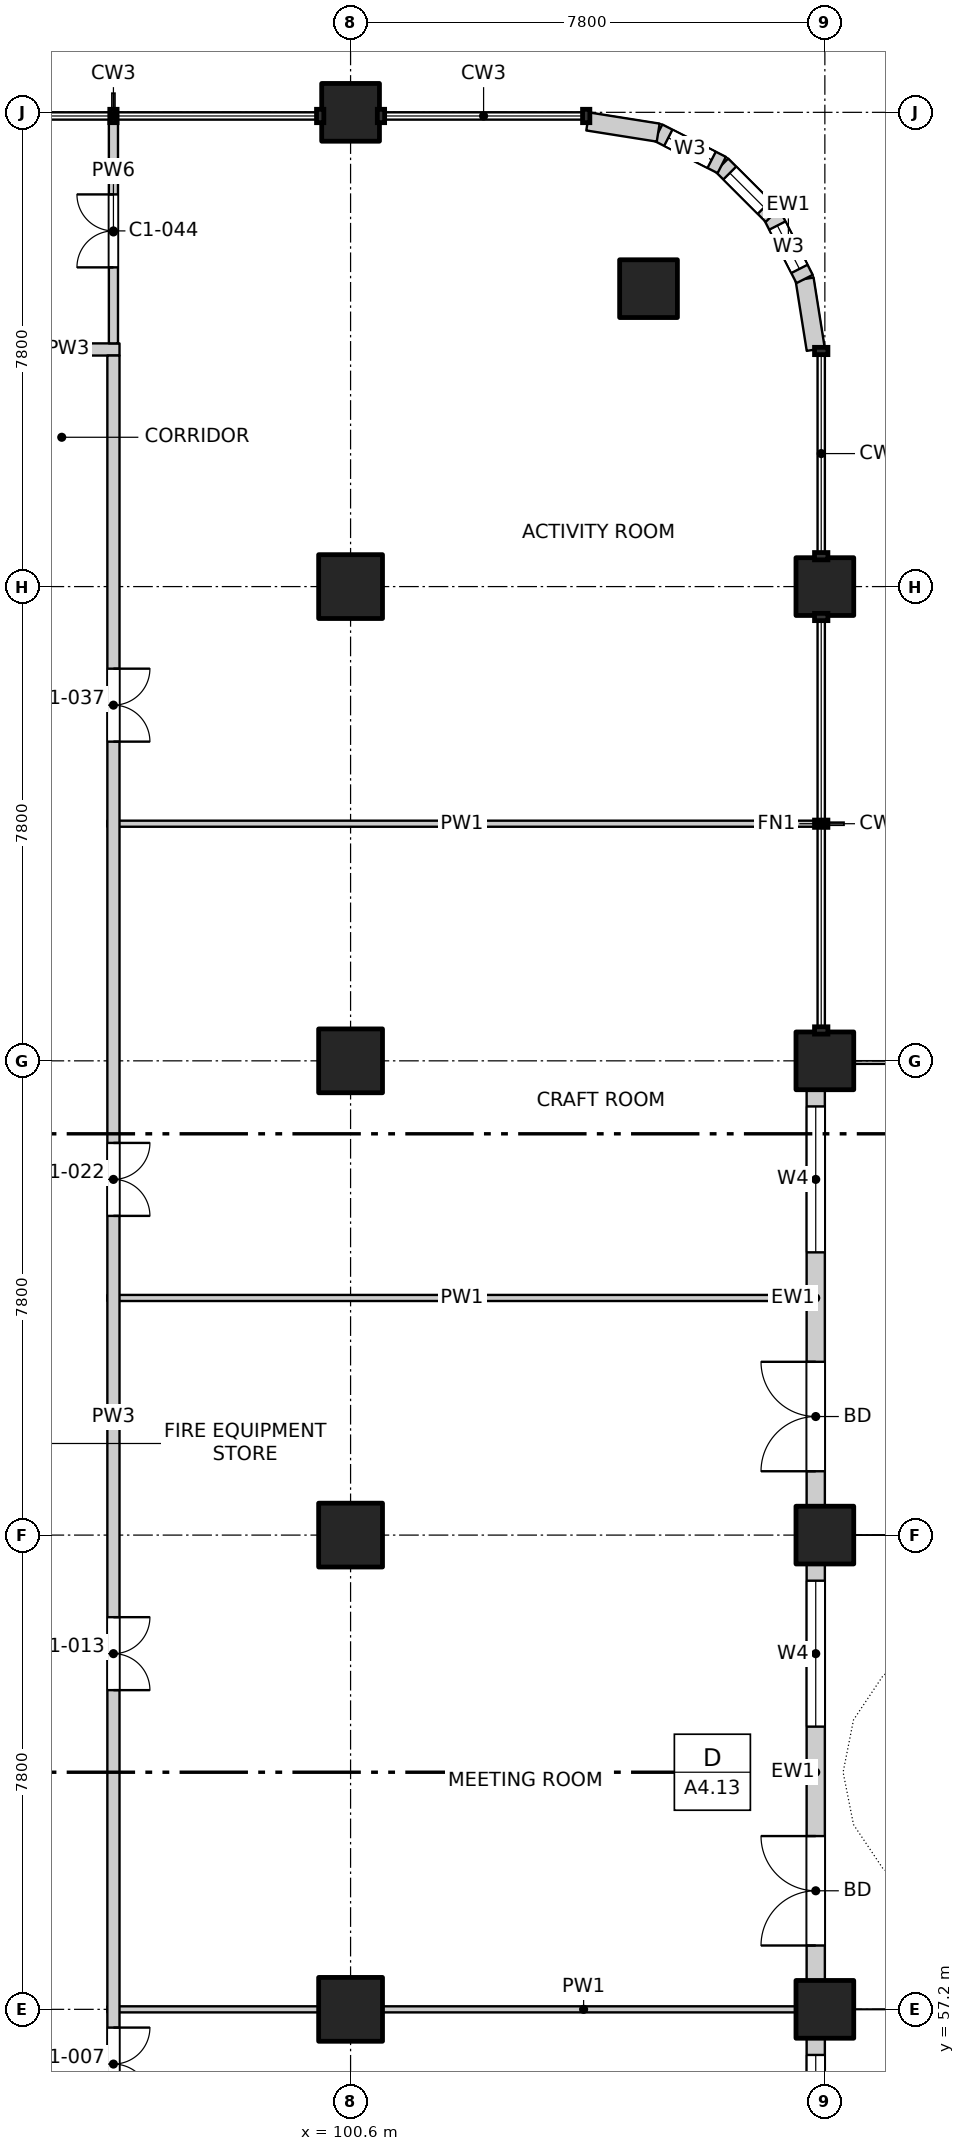
"""IFC4 building model, lengths in metres.
Left out: names, types, materials, properties, quantities, classifications, styles, units other than length and angle.
Written with IfcOpenShell. Run it as: python <this file> out.ifc"""

import sys

from ifc_helpers import new_model, si_unit, direction, frame, frame_2d, origin, origin_2d, place, context, subcontext, project, spatial, rectangle, extrude, element, fill, save


model = new_model("IFC4")
c1 = context("Model", 3, precision=1e-05, world=origin(), true_north=direction((0.0, 1.0)))
c2 = subcontext(c1, "Body", "Model", "MODEL_VIEW")
j1 = project(units=[si_unit("LENGTHUNIT", "METRE"), si_unit("PLANEANGLEUNIT", "RADIAN")], contexts=[c1])
p1 = place(None, origin())
s1 = spatial("IfcSite", under=j1, at=p1, CompositionType="ELEMENT")
p2 = place(p1, origin())
s2 = spatial("IfcBuilding", under=s1, at=p2, CompositionType="ELEMENT")
p3 = place(p2, frame((0.0, 0.0, 71.6)))
s3 = spatial("IfcBuildingStorey", under=s2, at=p3, CompositionType="ELEMENT", Elevation=71.6)
for number, where, z_axis, x_axis in (
    (1, (105.5, 85.5, -0.25), (0.0, 0.0, 1.0), (1.0, 0.0, 0.0)),
    (2, (108.4, 57.2, -0.25), (0.0, 0.0, 1.0), (1.0, 0.0, 0.0)),
    (3, (108.4, 65.0, -0.25), (0.0, 0.0, 1.0), (1.0, 0.0, 0.0)),
    (4, (108.4, 72.8, -0.25), (0.0, 0.0, 1.0), (1.0, 0.0, 0.0)),
    (5, (108.4, 80.6, -0.25), (0.0, 0.0, 1.0), (1.0, 0.0, 0.0)),
    (6, (100.6, 88.4, -0.25), (0.0, 0.0, 1.0), (1.0, 0.0, 0.0)),
):
    element("IfcColumn", number, at=place(p3, frame(where, z_axis=z_axis, x_axis=x_axis)), inside=s3, PredefinedType="COLUMN", context=c2, shape_type="SweptSolid", body=[
        extrude(rectangle(XDim=0.95, YDim=0.95, at=origin_2d()), origin(), (0.0, 0.0, 1.0), 3.4),
    ])
for number, where, z_axis, x_axis in (
    (7, (100.6, 57.2, -0.25), (0.0, 0.0, 1.0), (1.0, 0.0, 0.0)),
    (8, (100.6, 65.0, -0.25), (0.0, 0.0, 1.0), (1.0, 0.0, 0.0)),
    (9, (100.6, 72.8, -0.25), (0.0, 0.0, 1.0), (1.0, 0.0, 0.0)),
    (10, (100.6, 80.6, -0.25), (0.0, 0.0, 1.0), (1.0, 0.0, 0.0)),
):
    element("IfcColumn", number, at=place(p3, frame(where, z_axis=z_axis, x_axis=x_axis)), inside=s3, PredefinedType="COLUMN", context=c2, shape_type="SweptSolid", body=[
        extrude(rectangle(XDim=1.05, YDim=1.05, at=origin_2d()), origin(), (0.0, 0.0, 1.0), 3.4),
    ])
p4 = place(p3, frame((108.25, 49.875, 0.0), z_axis=(0.0, 0.0, 1.0), x_axis=(0.0, 1.0, 0.0)))
e11 = element("IfcWall", 11, at=p4, inside=s3, PredefinedType="SOLIDWALL", context=c2, shape_type="SweptSolid", body=[
    extrude(rectangle(XDim=6.85, YDim=0.3, at=frame_2d((3.425, 0.0))), origin(), (0.0, 0.0, 1.0), 2.7),
])
p5 = place(p4, frame((0.575, 0.0, 0.0)))
e12 = element("IfcOpeningElement", 12, at=p5, cuts=e11, PredefinedType="OPENING", context=c2, shape_type="SweptSolid", body=[
    extrude(rectangle(XDim=1.8, YDim=2.4, at=frame_2d((0.9, 1.2))), frame((0.0, 0.16, 0.0), z_axis=(0.0, -1.0, 0.0), x_axis=(1.0, 0.0, 0.0)), (0.0, 0.0, 1.0), 0.32),
])
p6 = place(p4, frame((4.175, 0.0, 0.6)))
e13 = element("IfcOpeningElement", 13, at=p6, cuts=e11, PredefinedType="OPENING", context=c2, shape_type="SweptSolid", body=[
    extrude(rectangle(XDim=2.4, YDim=2.1, at=frame_2d((1.2, 1.05))), frame((0.0, 0.16, 0.0), z_axis=(0.0, -1.0, 0.0), x_axis=(1.0, 0.0, 0.0)), (0.0, 0.0, 1.0), 0.32),
])
p7 = place(p3, frame((108.25, 57.675, 0.0), z_axis=(0.0, 0.0, 1.0), x_axis=(0.0, 1.0, 0.0)))
e14 = element("IfcWall", 14, at=p7, inside=s3, PredefinedType="SOLIDWALL", context=c2, shape_type="SweptSolid", body=[
    extrude(rectangle(XDim=6.85, YDim=0.3, at=frame_2d((3.425, 0.0))), origin(), (0.0, 0.0, 1.0), 2.7),
])
p8 = place(p7, frame((0.575, 0.0, 0.0)))
e15 = element("IfcOpeningElement", 15, at=p8, cuts=e14, PredefinedType="OPENING", context=c2, shape_type="SweptSolid", body=[
    extrude(rectangle(XDim=1.8, YDim=2.4, at=frame_2d((0.9, 1.2))), frame((0.0, 0.16, 0.0), z_axis=(0.0, -1.0, 0.0), x_axis=(1.0, 0.0, 0.0)), (0.0, 0.0, 1.0), 0.32),
])
p9 = place(p7, frame((4.175, 0.0, 0.6)))
e16 = element("IfcOpeningElement", 16, at=p9, cuts=e14, PredefinedType="OPENING", context=c2, shape_type="SweptSolid", body=[
    extrude(rectangle(XDim=2.4, YDim=2.1, at=frame_2d((1.2, 1.05))), frame((0.0, 0.16, 0.0), z_axis=(0.0, -1.0, 0.0), x_axis=(1.0, 0.0, 0.0)), (0.0, 0.0, 1.0), 0.32),
])
p10 = place(p3, frame((108.25, 65.475, 0.0), z_axis=(0.0, 0.0, 1.0), x_axis=(0.0, 1.0, 0.0)))
e17 = element("IfcWall", 17, at=p10, inside=s3, PredefinedType="SOLIDWALL", context=c2, shape_type="SweptSolid", body=[
    extrude(rectangle(XDim=6.85, YDim=0.3, at=frame_2d((3.425, 0.0))), origin(), (0.0, 0.0, 1.0), 2.7),
])
p11 = place(p10, frame((0.575, 0.0, 0.0)))
e18 = element("IfcOpeningElement", 18, at=p11, cuts=e17, PredefinedType="OPENING", context=c2, shape_type="SweptSolid", body=[
    extrude(rectangle(XDim=1.8, YDim=2.4, at=frame_2d((0.9, 1.2))), frame((0.0, 0.16, 0.0), z_axis=(0.0, -1.0, 0.0), x_axis=(1.0, 0.0, 0.0)), (0.0, 0.0, 1.0), 0.32),
])
p12 = place(p10, frame((4.175, 0.0, 0.6)))
e19 = element("IfcOpeningElement", 19, at=p12, cuts=e17, PredefinedType="OPENING", context=c2, shape_type="SweptSolid", body=[
    extrude(rectangle(XDim=2.4, YDim=2.1, at=frame_2d((1.2, 1.05))), frame((0.0, 0.16, 0.0), z_axis=(0.0, -1.0, 0.0), x_axis=(1.0, 0.0, 0.0)), (0.0, 0.0, 1.0), 0.32),
])
p13 = place(p3, frame((108.25, 84.5, 0.0), z_axis=(0.0, 0.0, 1.0), x_axis=(-0.156496880861, 0.987678452879, 0.0)))
e20 = element("IfcWall", 20, at=p13, inside=s3, PredefinedType="SOLIDWALL", context=c2, shape_type="SweptSolid", body=[
    extrude(rectangle(XDim=1.173, YDim=0.3, at=frame_2d((0.586, 0.0))), origin(), (0.0, 0.0, 1.0), 2.7),
])
p14 = place(p3, frame((108.066, 85.659, 0.0), z_axis=(0.0, 0.0, 1.0), x_axis=(-0.454025524128, 0.890988677504, 0.0)))
e21 = element("IfcWall", 21, at=p14, inside=s3, PredefinedType="SOLIDWALL", context=c2, shape_type="SweptSolid", body=[
    extrude(rectangle(XDim=1.173, YDim=0.3, at=frame_2d((0.587, 0.0))), origin(), (0.0, 0.0, 1.0), 2.7),
])
p15 = place(p14, frame((0.187, 0.0, 0.9)))
e22 = element("IfcOpeningElement", 22, at=p15, cuts=e21, PredefinedType="OPENING", context=c2, shape_type="SweptSolid", body=[
    extrude(rectangle(XDim=0.8, YDim=1.2, at=frame_2d((0.4, 0.6))), frame((0.0, 0.16, 0.0), z_axis=(0.0, -1.0, 0.0), x_axis=(1.0, 0.0, 0.0)), (0.0, 0.0, 1.0), 0.32),
])
p16 = place(p3, frame((107.534, 86.704, 0.0), z_axis=(0.0, 0.0, 1.0), x_axis=(-0.707106781187, 0.707106781187, 0.0)))
e23 = element("IfcWall", 23, at=p16, inside=s3, PredefinedType="SOLIDWALL", context=c2, shape_type="SweptSolid", body=[
    extrude(rectangle(XDim=1.173, YDim=0.3, at=frame_2d((0.586, 0.0))), origin(), (0.0, 0.0, 1.0), 2.7),
])
p17 = place(p16, frame((0.187, 0.0, 0.9)))
e24 = element("IfcOpeningElement", 24, at=p17, cuts=e23, PredefinedType="OPENING", context=c2, shape_type="SweptSolid", body=[
    extrude(rectangle(XDim=0.8, YDim=1.2, at=frame_2d((0.4, 0.6))), frame((0.0, 0.16, 0.0), z_axis=(0.0, -1.0, 0.0), x_axis=(1.0, 0.0, 0.0)), (0.0, 0.0, 1.0), 0.32),
])
p18 = place(p3, frame((106.704, 87.534, 0.0), z_axis=(0.0, 0.0, 1.0), x_axis=(-0.890988677504, 0.454025524128, 0.0)))
e25 = element("IfcWall", 25, at=p18, inside=s3, PredefinedType="SOLIDWALL", context=c2, shape_type="SweptSolid", body=[
    extrude(rectangle(XDim=1.173, YDim=0.3, at=frame_2d((0.587, 0.0))), origin(), (0.0, 0.0, 1.0), 2.7),
])
p19 = place(p18, frame((0.187, 0.0, 0.9)))
e26 = element("IfcOpeningElement", 26, at=p19, cuts=e25, PredefinedType="OPENING", context=c2, shape_type="SweptSolid", body=[
    extrude(rectangle(XDim=0.8, YDim=1.2, at=frame_2d((0.4, 0.6))), frame((0.0, 0.16, 0.0), z_axis=(0.0, -1.0, 0.0), x_axis=(1.0, 0.0, 0.0)), (0.0, 0.0, 1.0), 0.32),
])
p20 = place(p3, frame((105.659, 88.066, 0.0), z_axis=(0.0, 0.0, 1.0), x_axis=(-0.987678452879, 0.156496880861, 0.0)))
e27 = element("IfcWall", 27, at=p20, inside=s3, PredefinedType="SOLIDWALL", context=c2, shape_type="SweptSolid", body=[
    extrude(rectangle(XDim=1.173, YDim=0.3, at=frame_2d((0.586, 0.0))), origin(), (0.0, 0.0, 1.0), 2.7),
])
p21 = place(p3, frame((96.6, 57.2, 0.0), z_axis=(0.0, 0.0, 1.0), x_axis=(1.0, 0.0, 0.0)))
e28 = element("IfcWall", 28, at=p21, inside=s3, PredefinedType="PARTITIONING", context=c2, shape_type="SweptSolid", body=[
    extrude(rectangle(XDim=4.0, YDim=0.1, at=frame_2d((2.0, 0.0))), origin(), (0.0, 0.0, 1.0), 3.15),
])
p22 = place(p3, frame((100.6, 57.2, 0.0), z_axis=(0.0, 0.0, 1.0), x_axis=(1.0, 0.0, 0.0)))
e29 = element("IfcWall", 29, at=p22, inside=s3, PredefinedType="PARTITIONING", context=c2, shape_type="SweptSolid", body=[
    extrude(rectangle(XDim=7.665, YDim=0.1, at=frame_2d((3.833, 0.0))), origin(), (0.0, 0.0, 1.0), 2.55),
])
for number, where, z_axis, x_axis in (
    (30, (96.6, 68.9, 0.0), (0.0, 0.0, 1.0), (1.0, 0.0, 0.0)),
    (31, (96.6, 76.7, 0.0), (0.0, 0.0, 1.0), (1.0, 0.0, 0.0)),
):
    element("IfcWall", number, at=place(p3, frame(where, z_axis=z_axis, x_axis=x_axis)), inside=s3, PredefinedType="PARTITIONING", context=c2, shape_type="SweptSolid", body=[
        extrude(rectangle(XDim=11.665, YDim=0.1, at=frame_2d((5.833, 0.0))), origin(), (0.0, 0.0, 1.0), 3.15),
    ])
p23 = place(p3, frame((95.1, 84.5, 0.0), z_axis=(0.0, 0.0, 1.0), x_axis=(1.0, 0.0, 0.0)))
e32 = element("IfcWall", 32, at=p23, inside=s3, PredefinedType="PARTITIONING", context=c2, shape_type="SweptSolid", body=[
    extrude(rectangle(XDim=1.7, YDim=0.2, at=frame_2d((0.85, 0.0))), origin(), (0.0, 0.0, 1.0), 3.15),
])
p24 = place(p3, frame((96.7, 49.5, 0.0), z_axis=(0.0, 0.0, 1.0), x_axis=(0.0, 1.0, 0.0)))
e33 = element("IfcWall", 33, at=p24, inside=s3, PredefinedType="PARTITIONING", context=c2, shape_type="SweptSolid", body=[
    extrude(rectangle(XDim=34.9, YDim=0.2, at=frame_2d((17.45, 0.0))), origin(), (0.0, 0.0, 1.0), 3.15),
])
p25 = place(p24, frame((6.2, 0.0, 0.0)))
e34 = element("IfcOpeningElement", 34, at=p25, cuts=e33, PredefinedType="OPENING", context=c2, shape_type="SweptSolid", body=[
    extrude(rectangle(XDim=1.2, YDim=2.1, at=frame_2d((0.6, 1.05))), frame((0.0, 0.11, 0.0), z_axis=(0.0, -1.0, 0.0), x_axis=(1.0, 0.0, 0.0)), (0.0, 0.0, 1.0), 0.22),
])
p26 = place(p24, frame((12.95, 0.0, 0.0)))
e35 = element("IfcOpeningElement", 35, at=p26, cuts=e33, PredefinedType="OPENING", context=c2, shape_type="SweptSolid", body=[
    extrude(rectangle(XDim=1.2, YDim=2.1, at=frame_2d((0.6, 1.05))), frame((0.0, 0.11, 0.0), z_axis=(0.0, -1.0, 0.0), x_axis=(1.0, 0.0, 0.0)), (0.0, 0.0, 1.0), 0.22),
])
p27 = place(p24, frame((20.75, 0.0, 0.0)))
e36 = element("IfcOpeningElement", 36, at=p27, cuts=e33, PredefinedType="OPENING", context=c2, shape_type="SweptSolid", body=[
    extrude(rectangle(XDim=1.2, YDim=2.1, at=frame_2d((0.6, 1.05))), frame((0.0, 0.11, 0.0), z_axis=(0.0, -1.0, 0.0), x_axis=(1.0, 0.0, 0.0)), (0.0, 0.0, 1.0), 0.22),
])
p28 = place(p24, frame((28.55, 0.0, 0.0)))
e37 = element("IfcOpeningElement", 37, at=p28, cuts=e33, PredefinedType="OPENING", context=c2, shape_type="SweptSolid", body=[
    extrude(rectangle(XDim=1.2, YDim=2.1, at=frame_2d((0.6, 1.05))), frame((0.0, 0.11, 0.0), z_axis=(0.0, -1.0, 0.0), x_axis=(1.0, 0.0, 0.0)), (0.0, 0.0, 1.0), 0.22),
])
p29 = place(p3, frame((96.7, 84.6, 0.0), z_axis=(0.0, 0.0, 1.0), x_axis=(0.0, 1.0, 0.0)))
e38 = element("IfcWall", 38, at=p29, inside=s3, PredefinedType="PARTITIONING", context=c2, shape_type="SweptSolid", body=[
    extrude(rectangle(XDim=3.665, YDim=0.15, at=frame_2d((1.833, 0.0))), origin(), (0.0, 0.0, 1.0), 3.15),
])
p30 = place(p29, frame((1.25, 0.0, 0.0)))
e39 = element("IfcOpeningElement", 39, at=p30, cuts=e38, PredefinedType="OPENING", context=c2, shape_type="SweptSolid", body=[
    extrude(rectangle(XDim=1.2, YDim=2.1, at=frame_2d((0.6, 1.05))), frame((0.0, 0.085, 0.0), z_axis=(0.0, -1.0, 0.0), x_axis=(1.0, 0.0, 0.0)), (0.0, 0.0, 1.0), 0.17),
])
p31 = place(p6, origin())
e40 = element("IfcWindow", 40, at=p31, inside=s3, PartitioningType="SINGLE_PANEL", PredefinedType="WINDOW", context=c2, shape_type="SweptSolid", body=[
    extrude(rectangle(XDim=2.4, YDim=2.1, at=frame_2d((1.2, 1.05))), frame((0.0, 0.03, 0.0), z_axis=(0.0, -1.0, 0.0), x_axis=(1.0, 0.0, 0.0)), (0.0, 0.0, 1.0), 0.06),
])
fill(e13, e40)
p32 = place(p8, origin())
e41 = element("IfcDoor", 41, at=p32, inside=s3, OperationType="DOUBLE_DOOR_SINGLE_SWING", PredefinedType="DOOR", context=c2, shape_type="SweptSolid", body=[
    extrude(rectangle(XDim=1.8, YDim=2.4, at=frame_2d((0.9, 1.2))), frame((0.0, 0.025, 0.0), z_axis=(0.0, -1.0, 0.0), x_axis=(1.0, 0.0, 0.0)), (0.0, 0.0, 1.0), 0.05),
])
fill(e15, e41)
p33 = place(p9, origin())
e42 = element("IfcWindow", 42, at=p33, inside=s3, PartitioningType="SINGLE_PANEL", PredefinedType="WINDOW", context=c2, shape_type="SweptSolid", body=[
    extrude(rectangle(XDim=2.4, YDim=2.1, at=frame_2d((1.2, 1.05))), frame((0.0, 0.03, 0.0), z_axis=(0.0, -1.0, 0.0), x_axis=(1.0, 0.0, 0.0)), (0.0, 0.0, 1.0), 0.06),
])
fill(e16, e42)
p34 = place(p11, origin())
e43 = element("IfcDoor", 43, at=p34, inside=s3, OperationType="DOUBLE_DOOR_SINGLE_SWING", PredefinedType="DOOR", context=c2, shape_type="SweptSolid", body=[
    extrude(rectangle(XDim=1.8, YDim=2.4, at=frame_2d((0.9, 1.2))), frame((0.0, 0.025, 0.0), z_axis=(0.0, -1.0, 0.0), x_axis=(1.0, 0.0, 0.0)), (0.0, 0.0, 1.0), 0.05),
])
fill(e18, e43)
p35 = place(p12, origin())
e44 = element("IfcWindow", 44, at=p35, inside=s3, PartitioningType="SINGLE_PANEL", PredefinedType="WINDOW", context=c2, shape_type="SweptSolid", body=[
    extrude(rectangle(XDim=2.4, YDim=2.1, at=frame_2d((1.2, 1.05))), frame((0.0, 0.03, 0.0), z_axis=(0.0, -1.0, 0.0), x_axis=(1.0, 0.0, 0.0)), (0.0, 0.0, 1.0), 0.06),
])
fill(e19, e44)
p36 = place(p15, origin())
e45 = element("IfcWindow", 45, at=p36, inside=s3, PartitioningType="SINGLE_PANEL", PredefinedType="WINDOW", context=c2, shape_type="SweptSolid", body=[
    extrude(rectangle(XDim=0.8, YDim=1.2, at=frame_2d((0.4, 0.6))), frame((0.0, 0.03, 0.0), z_axis=(0.0, -1.0, 0.0), x_axis=(1.0, 0.0, 0.0)), (0.0, 0.0, 1.0), 0.06),
])
fill(e22, e45)
p37 = place(p17, origin())
e46 = element("IfcWindow", 46, at=p37, inside=s3, PartitioningType="SINGLE_PANEL", PredefinedType="WINDOW", context=c2, shape_type="SweptSolid", body=[
    extrude(rectangle(XDim=0.8, YDim=1.2, at=frame_2d((0.4, 0.6))), frame((0.0, 0.03, 0.0), z_axis=(0.0, -1.0, 0.0), x_axis=(1.0, 0.0, 0.0)), (0.0, 0.0, 1.0), 0.06),
])
fill(e24, e46)
p38 = place(p19, origin())
e47 = element("IfcWindow", 47, at=p38, inside=s3, PartitioningType="SINGLE_PANEL", PredefinedType="WINDOW", context=c2, shape_type="SweptSolid", body=[
    extrude(rectangle(XDim=0.8, YDim=1.2, at=frame_2d((0.4, 0.6))), frame((0.0, 0.03, 0.0), z_axis=(0.0, -1.0, 0.0), x_axis=(1.0, 0.0, 0.0)), (0.0, 0.0, 1.0), 0.06),
])
fill(e26, e47)
p39 = place(p25, origin())
e48 = element("IfcDoor", 48, at=p39, inside=s3, OperationType="DOUBLE_DOOR_SINGLE_SWING", PredefinedType="DOOR", context=c2, shape_type="SweptSolid", body=[
    extrude(rectangle(XDim=1.2, YDim=2.1, at=frame_2d((0.6, 1.05))), frame((0.0, 0.025, 0.0), z_axis=(0.0, -1.0, 0.0), x_axis=(1.0, 0.0, 0.0)), (0.0, 0.0, 1.0), 0.05),
])
fill(e34, e48)
p40 = place(p26, origin())
e49 = element("IfcDoor", 49, at=p40, inside=s3, OperationType="DOUBLE_DOOR_SINGLE_SWING", PredefinedType="DOOR", context=c2, shape_type="SweptSolid", body=[
    extrude(rectangle(XDim=1.2, YDim=2.1, at=frame_2d((0.6, 1.05))), frame((0.0, 0.025, 0.0), z_axis=(0.0, -1.0, 0.0), x_axis=(1.0, 0.0, 0.0)), (0.0, 0.0, 1.0), 0.05),
])
fill(e35, e49)
p41 = place(p27, origin())
e50 = element("IfcDoor", 50, at=p41, inside=s3, OperationType="DOUBLE_DOOR_SINGLE_SWING", PredefinedType="DOOR", context=c2, shape_type="SweptSolid", body=[
    extrude(rectangle(XDim=1.2, YDim=2.1, at=frame_2d((0.6, 1.05))), frame((0.0, 0.025, 0.0), z_axis=(0.0, -1.0, 0.0), x_axis=(1.0, 0.0, 0.0)), (0.0, 0.0, 1.0), 0.05),
])
fill(e36, e50)
p42 = place(p28, origin())
e51 = element("IfcDoor", 51, at=p42, inside=s3, OperationType="DOUBLE_DOOR_SINGLE_SWING", PredefinedType="DOOR", context=c2, shape_type="SweptSolid", body=[
    extrude(rectangle(XDim=1.2, YDim=2.1, at=frame_2d((0.6, 1.05))), frame((0.0, 0.025, 0.0), z_axis=(0.0, -1.0, 0.0), x_axis=(1.0, 0.0, 0.0)), (0.0, 0.0, 1.0), 0.05),
])
fill(e37, e51)
p43 = place(p30, origin())
e52 = element("IfcDoor", 52, at=p43, inside=s3, OperationType="DOUBLE_DOOR_SINGLE_SWING", PredefinedType="DOOR", context=c2, shape_type="SweptSolid", body=[
    extrude(rectangle(XDim=1.2, YDim=2.1, at=frame_2d((0.6, 1.05))), frame((0.0, 0.025, 0.0), z_axis=(0.0, -1.0, 0.0), x_axis=(1.0, 0.0, 0.0)), (0.0, 0.0, 1.0), 0.05),
])
fill(e39, e52)
save(model, sys.argv[1])
